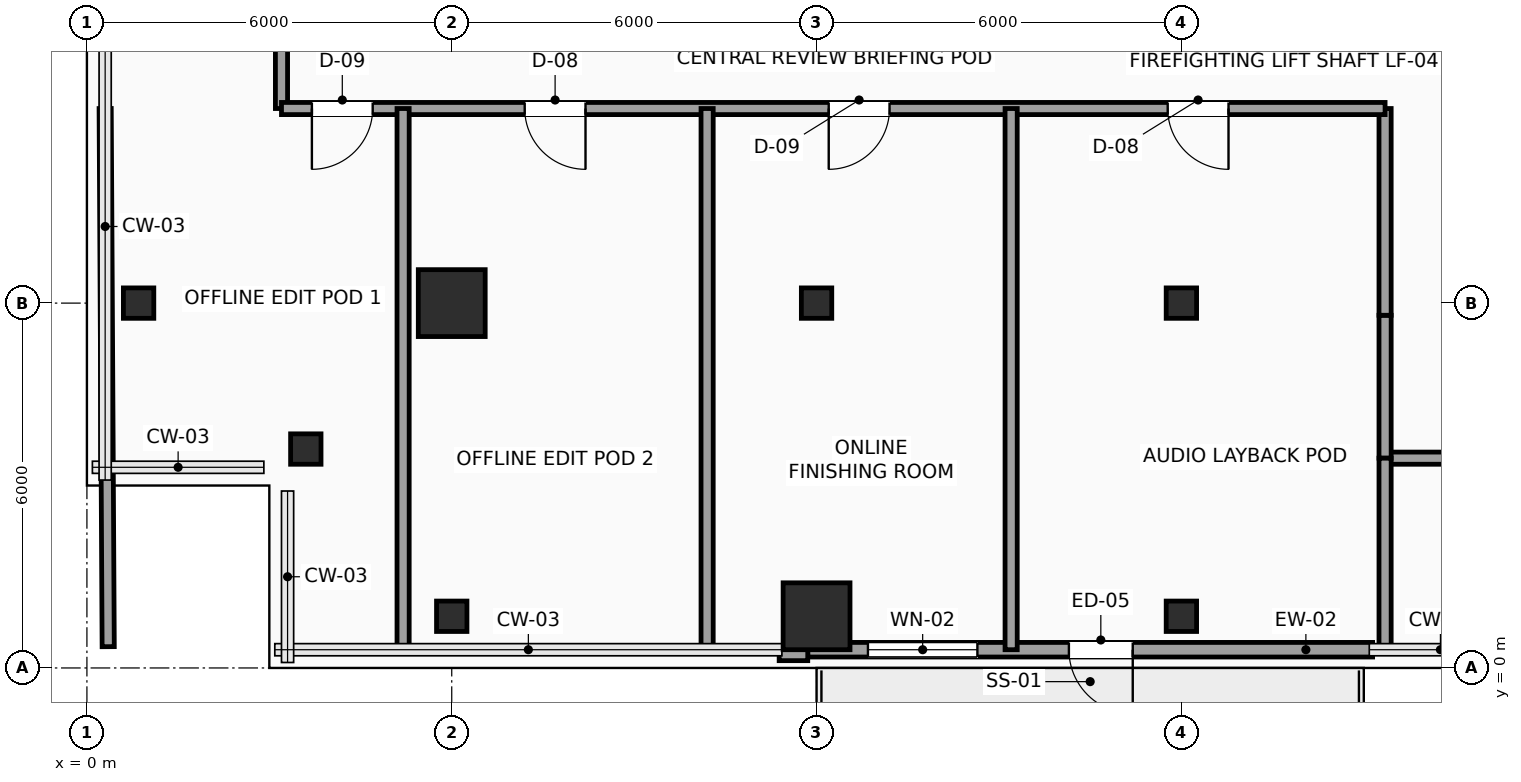
"""IFC4 building model, lengths in metres.
Left out: names, types, materials, properties, quantities, classifications, styles, units other than length and angle.
Written with IfcOpenShell. Run it as: python <this file> out.ifc"""

import sys

from ifc_helpers import new_model, si_unit, direction, frame, frame_2d, origin, origin_2d, place, context, subcontext, project, spatial, rectangle, hollow_rectangle, extrude, element, fill, save


model = new_model("IFC4")
c1 = context("Model", 3, precision=1e-05, world=origin(), true_north=direction((0.0, 1.0)))
c2 = subcontext(c1, "Body", "Model", "MODEL_VIEW")
j1 = project(units=[si_unit("LENGTHUNIT", "METRE"), si_unit("PLANEANGLEUNIT", "RADIAN")], contexts=[c1])
p1 = place(None, origin())
s1 = spatial("IfcSite", under=j1, at=p1, CompositionType="ELEMENT")
p2 = place(p1, origin())
s2 = spatial("IfcBuilding", under=s1, at=p2, CompositionType="ELEMENT")
p3 = place(p2, frame((0.0, 0.0, 115.65)))
s3 = spatial("IfcBuildingStorey", under=s2, at=p3, CompositionType="ELEMENT", Elevation=115.65)
for number, where, z_axis, x_axis in (
    (1, (3.6, 3.6, 0.0), (0.0, 0.0, 1.0), (1.0, 0.0, 0.0)),
    (2, (0.85, 6.0, 0.0), (0.0, 0.0, 1.0), (1.0, 0.0, 0.0)),
    (3, (6.0, 0.85, 0.0), (0.0, 0.0, 1.0), (1.0, 0.0, 0.0)),
):
    element("IfcColumn", number, at=place(p3, frame(where, z_axis=z_axis, x_axis=x_axis)), inside=s3, PredefinedType="COLUMN", context=c2, shape_type="SweptSolid", body=[
        extrude(hollow_rectangle(XDim=0.5, YDim=0.5, WallThickness=0.025, InnerFilletRadius=0.025, OuterFilletRadius=0.04, at=origin_2d()), origin(), (0.0, 0.0, 1.0), 3.75),
    ])
for number, where, z_axis, x_axis in (
    (4, (6.0, 6.0, 0.0), (0.0, 0.0, 1.0), (1.0, 0.0, 0.0)),
    (5, (12.0, 0.85, 0.0), (0.0, 0.0, 1.0), (1.0, 0.0, 0.0)),
):
    element("IfcColumn", number, at=place(p3, frame(where, z_axis=z_axis, x_axis=x_axis)), inside=s3, PredefinedType="COLUMN", context=c2, shape_type="SweptSolid", body=[
        extrude(rectangle(XDim=1.1, YDim=1.1, at=origin_2d()), origin(), (0.0, 0.0, 1.0), 3.75),
    ])
for number, where, z_axis, x_axis in (
    (6, (12.0, 6.0, 0.0), (0.0, 0.0, 1.0), (1.0, 0.0, 0.0)),
    (7, (18.0, 0.85, 0.0), (0.0, 0.0, 1.0), (1.0, 0.0, 0.0)),
    (8, (18.0, 6.0, 0.0), (0.0, 0.0, 1.0), (1.0, 0.0, 0.0)),
):
    element("IfcColumn", number, at=place(p3, frame(where, z_axis=z_axis, x_axis=x_axis)), inside=s3, PredefinedType="COLUMN", context=c2, shape_type="SweptSolid", body=[
        extrude(hollow_rectangle(XDim=0.5, YDim=0.5, WallThickness=0.025, InnerFilletRadius=0.025, OuterFilletRadius=0.04, at=origin_2d()), origin(), (0.0, 0.0, 1.0), 3.75),
    ])
p4 = place(p3, frame((21.145, 0.3, 0.0), z_axis=(0.0, 0.0, 1.0), x_axis=(-1.0, 0.0, 0.0)))
e9 = element("IfcWall", 9, at=p4, inside=s3, PredefinedType="SOLIDWALL", context=c2, shape_type="SweptSolid", body=[
    extrude(rectangle(XDim=9.29, YDim=0.24, at=frame_2d((4.645, 0.0))), origin(), (0.0, 0.0, 1.0), 3.525),
])
p5 = place(p4, frame((3.945, 0.0, 0.0)))
e10 = element("IfcOpeningElement", 10, at=p5, cuts=e9, PredefinedType="OPENING", context=c2, shape_type="SweptSolid", body=[
    extrude(rectangle(XDim=1.05, YDim=2.2, at=frame_2d((0.525, 1.1))), frame((0.0, 0.13, 0.0), z_axis=(0.0, -1.0, 0.0), x_axis=(1.0, 0.0, 0.0)), (0.0, 0.0, 1.0), 0.26),
])
p6 = place(p4, frame((6.5, 0.0, 0.85)))
e11 = element("IfcOpeningElement", 11, at=p6, cuts=e9, PredefinedType="OPENING", context=c2, shape_type="SweptSolid", body=[
    extrude(rectangle(XDim=1.8, YDim=2.1, at=frame_2d((0.9, 1.05))), frame((0.0, 0.13, 0.0), z_axis=(0.0, -1.0, 0.0), x_axis=(1.0, 0.0, 0.0)), (0.0, 0.0, 1.0), 0.26),
])
p7 = place(p3, frame((11.855, 0.24, 0.0), z_axis=(0.0, 0.0, 1.0), x_axis=(-1.0, 0.0, 0.0)))
e12 = element("IfcWall", 12, at=p7, inside=s3, PredefinedType="SOLIDWALL", context=c2, shape_type="SweptSolid", body=[
    extrude(rectangle(XDim=0.47, YDim=0.24, at=frame_2d((0.235, 0.0))), origin(), (0.0, 0.0, 1.0), 3.525),
])
p8 = place(p3, frame((3.2, 9.2, 0.0), z_axis=(0.0, 0.0, 1.0), x_axis=(0.0, 1.0, 0.0)))
e13 = element("IfcWall", 13, at=p8, inside=s3, PredefinedType="SOLIDWALL", context=c2, shape_type="SweptSolid", body=[
    extrude(rectangle(XDim=2.05, YDim=0.2, at=frame_2d((1.025, 0.0))), origin(), (0.0, 0.0, 1.0), 3.525),
])
p9 = place(p3, frame((23.95, 3.45, 0.0), z_axis=(0.0, 0.0, 1.0), x_axis=(-1.0, 0.0, 0.0)))
e14 = element("IfcWall", 14, at=p9, inside=s3, PredefinedType="SOLIDWALL", context=c2, shape_type="SweptSolid", body=[
    extrude(rectangle(XDim=2.6, YDim=0.2, at=frame_2d((1.3, 0.0))), origin(), (0.0, 0.0, 1.0), 3.067),
])
p10 = place(p3, frame((21.35, 3.45, 0.0), z_axis=(0.0, 0.0, 1.0), x_axis=(0.0, 1.0, 0.0)))
e15 = element("IfcWall", 15, at=p10, inside=s3, PredefinedType="SOLIDWALL", context=c2, shape_type="SweptSolid", body=[
    extrude(rectangle(XDim=2.35, YDim=0.2, at=frame_2d((1.175, 0.0))), origin(), (0.0, 0.0, 1.0), 3.525),
])
p11 = place(p3, frame((21.35, 5.8, 0.0), z_axis=(0.0, 0.0, 1.0), x_axis=(0.0, 1.0, 0.0)))
e16 = element("IfcWall", 16, at=p11, inside=s3, PredefinedType="SOLIDWALL", context=c2, shape_type="SweptSolid", body=[
    extrude(rectangle(XDim=3.4, YDim=0.2, at=frame_2d((1.7, 0.0))), origin(), (0.0, 0.0, 1.0), 3.525),
])
p12 = place(p3, frame((21.35, 9.2, 0.0), z_axis=(0.0, 0.0, 1.0), x_axis=(-1.0, 0.0, 0.0)))
e17 = element("IfcWall", 17, at=p12, inside=s3, PredefinedType="SOLIDWALL", context=c2, shape_type="SweptSolid", body=[
    extrude(rectangle(XDim=18.15, YDim=0.2, at=frame_2d((9.075, 0.0))), origin(), (0.0, 0.0, 1.0), 3.067),
])
p13 = place(p12, frame((16.65, 0.0, 0.0)))
e18 = element("IfcOpeningElement", 18, at=p13, cuts=e17, PredefinedType="OPENING", context=c2, shape_type="SweptSolid", body=[
    extrude(rectangle(XDim=1.0, YDim=2.2, at=frame_2d((0.5, 1.1))), frame((0.0, 0.11, 0.0), z_axis=(0.0, -1.0, 0.0), x_axis=(1.0, 0.0, 0.0)), (0.0, 0.0, 1.0), 0.22),
])
p14 = place(p12, frame((13.15, 0.0, 0.0)))
e19 = element("IfcOpeningElement", 19, at=p14, cuts=e17, PredefinedType="OPENING", context=c2, shape_type="SweptSolid", body=[
    extrude(rectangle(XDim=1.0, YDim=2.2, at=frame_2d((0.5, 1.1))), frame((0.0, 0.11, 0.0), z_axis=(0.0, -1.0, 0.0), x_axis=(1.0, 0.0, 0.0)), (0.0, 0.0, 1.0), 0.22),
])
p15 = place(p12, frame((8.15, 0.0, 0.0)))
e20 = element("IfcOpeningElement", 20, at=p15, cuts=e17, PredefinedType="OPENING", context=c2, shape_type="SweptSolid", body=[
    extrude(rectangle(XDim=1.0, YDim=2.2, at=frame_2d((0.5, 1.1))), frame((0.0, 0.11, 0.0), z_axis=(0.0, -1.0, 0.0), x_axis=(1.0, 0.0, 0.0)), (0.0, 0.0, 1.0), 0.22),
])
p16 = place(p12, frame((2.575, 0.0, 0.0)))
e21 = element("IfcOpeningElement", 21, at=p16, cuts=e17, PredefinedType="OPENING", context=c2, shape_type="SweptSolid", body=[
    extrude(rectangle(XDim=1.0, YDim=2.2, at=frame_2d((0.5, 1.1))), frame((0.0, 0.11, 0.0), z_axis=(0.0, -1.0, 0.0), x_axis=(1.0, 0.0, 0.0)), (0.0, 0.0, 1.0), 0.22),
])
p17 = place(p3, frame((21.35, 0.3, 0.0), z_axis=(0.0, 0.0, 1.0), x_axis=(0.0, 1.0, 0.0)))
e22 = element("IfcWall", 22, at=p17, inside=s3, PredefinedType="PARTITIONING", context=c2, shape_type="SweptSolid", body=[
    extrude(rectangle(XDim=3.15, YDim=0.2, at=frame_2d((1.575, 0.0))), origin(), (0.0, 0.0, 1.0), 3.525),
])
p18 = place(p3, frame((0.35, 0.35, 0.0), z_axis=(0.0, 0.0, 1.0), x_axis=(-0.005655237989, 0.999984009014, 0.0)))
e23 = element("IfcWall", 23, at=p18, inside=s3, PredefinedType="PARTITIONING", context=c2, shape_type="SweptSolid", body=[
    extrude(rectangle(XDim=8.85, YDim=0.2, at=frame_2d((4.425, 0.0))), origin(), (0.0, 0.0, 1.0), 3.525),
])
for number, where, z_axis, x_axis in (
    (24, (5.2, 0.3, 0.0), (0.0, 0.0, 1.0), (0.0, 1.0, 0.0)),
    (25, (10.2, 0.3, 0.0), (0.0, 0.0, 1.0), (0.0, 1.0, 0.0)),
    (26, (15.2, 0.3, 0.0), (0.0, 0.0, 1.0), (0.0, 1.0, 0.0)),
):
    element("IfcWall", number, at=place(p3, frame(where, z_axis=z_axis, x_axis=x_axis)), inside=s3, PredefinedType="PARTITIONING", context=c2, shape_type="SweptSolid", body=[
        extrude(rectangle(XDim=8.9, YDim=0.2, at=frame_2d((4.45, 0.0))), origin(), (0.0, 0.0, 1.0), 3.525),
    ])
p19 = place(p5, origin())
e27 = element("IfcDoor", 27, at=p19, inside=s3, OperationType="SINGLE_SWING_LEFT", PredefinedType="DOOR", context=c2, shape_type="SweptSolid", body=[
    extrude(rectangle(XDim=1.05, YDim=2.2, at=frame_2d((0.525, 1.1))), frame((0.0, 0.025, 0.0), z_axis=(0.0, -1.0, 0.0), x_axis=(1.0, 0.0, 0.0)), (0.0, 0.0, 1.0), 0.05),
])
fill(e10, e27)
p20 = place(p6, origin())
e28 = element("IfcWindow", 28, at=p20, inside=s3, PartitioningType="SINGLE_PANEL", PredefinedType="WINDOW", context=c2, shape_type="SweptSolid", body=[
    extrude(rectangle(XDim=1.8, YDim=2.1, at=frame_2d((0.9, 1.05))), frame((0.0, 0.03, 0.0), z_axis=(0.0, -1.0, 0.0), x_axis=(1.0, 0.0, 0.0)), (0.0, 0.0, 1.0), 0.06),
])
fill(e11, e28)
p21 = place(p13, origin())
e29 = element("IfcDoor", 29, at=p21, inside=s3, OperationType="SINGLE_SWING_RIGHT", PredefinedType="DOOR", context=c2, shape_type="SweptSolid", body=[
    extrude(rectangle(XDim=1.0, YDim=2.2, at=frame_2d((0.5, 1.1))), frame((0.0, 0.025, 0.0), z_axis=(0.0, -1.0, 0.0), x_axis=(1.0, 0.0, 0.0)), (0.0, 0.0, 1.0), 0.05),
])
fill(e18, e29)
p22 = place(p14, origin())
e30 = element("IfcDoor", 30, at=p22, inside=s3, OperationType="SINGLE_SWING_LEFT", PredefinedType="DOOR", context=c2, shape_type="SweptSolid", body=[
    extrude(rectangle(XDim=1.0, YDim=2.2, at=frame_2d((0.5, 1.1))), frame((0.0, 0.025, 0.0), z_axis=(0.0, -1.0, 0.0), x_axis=(1.0, 0.0, 0.0)), (0.0, 0.0, 1.0), 0.05),
])
fill(e19, e30)
p23 = place(p15, origin())
e31 = element("IfcDoor", 31, at=p23, inside=s3, OperationType="SINGLE_SWING_RIGHT", PredefinedType="DOOR", context=c2, shape_type="SweptSolid", body=[
    extrude(rectangle(XDim=1.0, YDim=2.2, at=frame_2d((0.5, 1.1))), frame((0.0, 0.025, 0.0), z_axis=(0.0, -1.0, 0.0), x_axis=(1.0, 0.0, 0.0)), (0.0, 0.0, 1.0), 0.05),
])
fill(e20, e31)
p24 = place(p16, origin())
e32 = element("IfcDoor", 32, at=p24, inside=s3, OperationType="SINGLE_SWING_LEFT", PredefinedType="DOOR", context=c2, shape_type="SweptSolid", body=[
    extrude(rectangle(XDim=1.0, YDim=2.2, at=frame_2d((0.5, 1.1))), frame((0.0, 0.025, 0.0), z_axis=(0.0, -1.0, 0.0), x_axis=(1.0, 0.0, 0.0)), (0.0, 0.0, 1.0), 0.05),
])
fill(e21, e32)
save(model, sys.argv[1])
